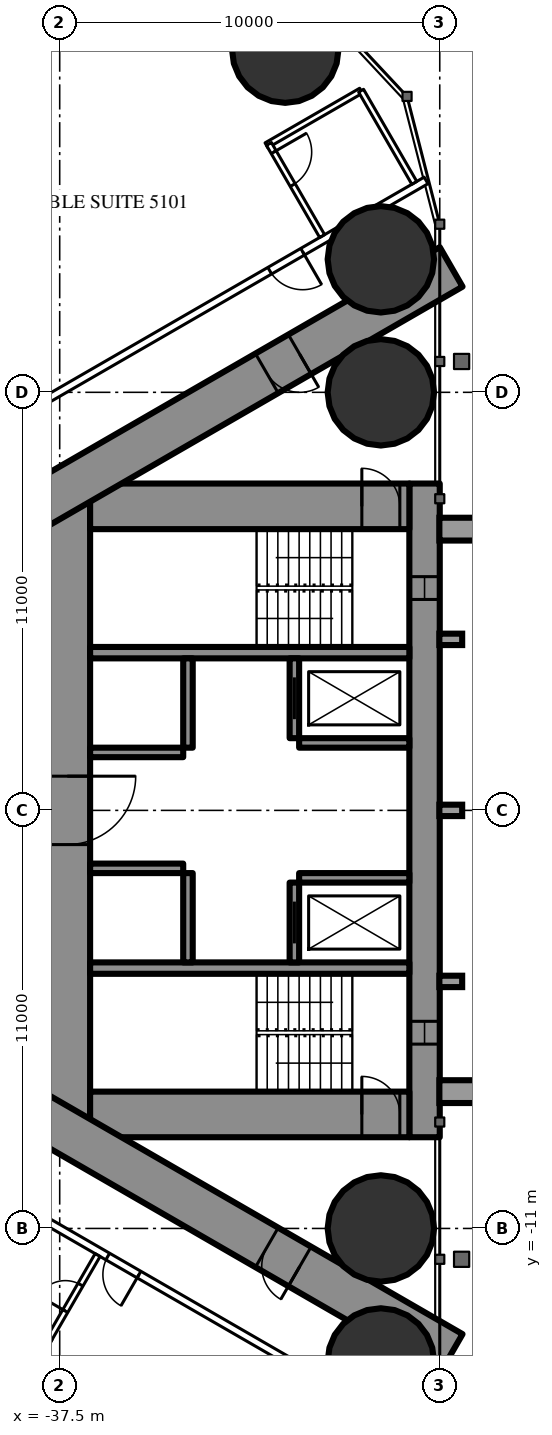
"""IFC4 building model, lengths in metres.
Left out: names, types, materials, properties, quantities, classifications, styles, units other than length and angle.
Written with IfcOpenShell. Run it as: python <this file> out.ifc"""

import sys

from ifc_helpers import new_model, si_unit, direction, frame, frame_2d, origin, origin_2d, place, context, subcontext, project, spatial, rectangle, circle, extrude, element, fill, save


model = new_model("IFC4")
c1 = context("Model", 3, precision=1e-05, world=origin(), true_north=direction((0.0, 1.0)))
c2 = subcontext(c1, "Body", "Model", "MODEL_VIEW")
j1 = project(units=[si_unit("LENGTHUNIT", "METRE"), si_unit("PLANEANGLEUNIT", "RADIAN")], contexts=[c1])
p1 = place(None, origin())
s1 = spatial("IfcSite", under=j1, at=p1, CompositionType="ELEMENT")
p2 = place(p1, origin())
s2 = spatial("IfcBuilding", under=s1, at=p2, CompositionType="ELEMENT")
p3 = place(p2, frame((0.0, 0.0, 191.3)))
s3 = spatial("IfcBuildingStorey", under=s2, at=p3, CompositionType="ELEMENT", Elevation=191.3)
for number, where, z_axis, x_axis in (
    (1, (-31.565, 20.016, 0.0), (0.0, 0.0, 1.0), (1.0, 0.0, 0.0)),
    (2, (-29.05, -11.0, 0.0), (0.0, 0.0, 1.0), (1.0, 0.0, 0.0)),
    (3, (-29.05, 11.0, 0.0), (0.0, 0.0, 1.0), (1.0, 0.0, 0.0)),
    (4, (-29.05, 14.5, 0.0), (0.0, 0.0, 1.0), (1.0, 0.0, 0.0)),
    (5, (-29.05, -14.5, 0.0), (0.0, 0.0, 1.0), (1.0, 0.0, 0.0)),
):
    element("IfcColumn", number, at=place(p3, frame(where, z_axis=z_axis, x_axis=x_axis)), inside=s3, PredefinedType="COLUMN", context=c2, shape_type="SweptSolid", body=[
        extrude(circle(Radius=1.4, at=origin_2d()), origin(), (0.0, 0.0, 1.0), 3.5),
    ])
p4 = place(p3, frame((-27.9, 8.6, 0.0), z_axis=(0.0, 0.0, 1.0), x_axis=(0.0, -1.0, 0.0)))
e6 = element("IfcWall", 6, at=p4, inside=s3, PredefinedType="SHEAR", context=c2, shape_type="SweptSolid", body=[
    extrude(rectangle(XDim=17.2, YDim=0.8, at=frame_2d((8.6, 0.0))), origin(), (0.0, 0.0, 1.0), 3.5),
])
p5 = place(p4, frame((2.45, 0.0, 0.6)))
e7 = element("IfcOpeningElement", 7, at=p5, cuts=e6, PredefinedType="OPENING", context=c2, shape_type="SweptSolid", body=[
    extrude(rectangle(XDim=0.6, YDim=2.1, at=frame_2d((0.3, 1.05))), frame((0.0, 0.41, 0.0), z_axis=(0.0, -1.0, 0.0), x_axis=(1.0, 0.0, 0.0)), (0.0, 0.0, 1.0), 0.82),
])
p6 = place(p4, frame((14.15, 0.0, 0.6)))
e8 = element("IfcOpeningElement", 8, at=p6, cuts=e6, PredefinedType="OPENING", context=c2, shape_type="SweptSolid", body=[
    extrude(rectangle(XDim=0.6, YDim=2.1, at=frame_2d((0.3, 1.05))), frame((0.0, 0.41, 0.0), z_axis=(0.0, -1.0, 0.0), x_axis=(1.0, 0.0, 0.0)), (0.0, 0.0, 1.0), 0.82),
])
p7 = place(p3, frame((-37.3, 8.6, 0.0), z_axis=(0.0, 0.0, 1.0), x_axis=(0.0, -1.0, 0.0)))
e9 = element("IfcWall", 9, at=p7, inside=s3, PredefinedType="SHEAR", context=c2, shape_type="SweptSolid", body=[
    extrude(rectangle(XDim=17.2, YDim=1.2, at=frame_2d((8.6, 0.0))), origin(), (0.0, 0.0, 1.0), 3.5),
])
p8 = place(p7, frame((7.7, 0.0, 0.0)))
e10 = element("IfcOpeningElement", 10, at=p8, cuts=e9, PredefinedType="OPENING", context=c2, shape_type="SweptSolid", body=[
    extrude(rectangle(XDim=1.8, YDim=2.2, at=frame_2d((0.9, 1.1))), frame((0.0, 0.61, 0.0), z_axis=(0.0, -1.0, 0.0), x_axis=(1.0, 0.0, 0.0)), (0.0, 0.0, 1.0), 1.22),
])
p9 = place(p3, frame((-28.3, 8.0, 0.0), z_axis=(0.0, 0.0, 1.0), x_axis=(-1.0, 0.0, 0.0)))
e11 = element("IfcWall", 11, at=p9, inside=s3, PredefinedType="SHEAR", context=c2, shape_type="SweptSolid", body=[
    extrude(rectangle(XDim=8.4, YDim=1.2, at=frame_2d((4.2, 0.0))), origin(), (0.0, 0.0, 1.0), 3.5),
])
p10 = place(p9, frame((0.25, 0.0, 0.0)))
e12 = element("IfcOpeningElement", 12, at=p10, cuts=e11, PredefinedType="OPENING", context=c2, shape_type="SweptSolid", body=[
    extrude(rectangle(XDim=1.0, YDim=2.2, at=frame_2d((0.5, 1.1))), frame((0.0, 0.61, 0.0), z_axis=(0.0, -1.0, 0.0), x_axis=(1.0, 0.0, 0.0)), (0.0, 0.0, 1.0), 1.22),
])
p11 = place(p3, frame((-28.3, -8.0, 0.0), z_axis=(0.0, 0.0, 1.0), x_axis=(-1.0, 0.0, 0.0)))
e13 = element("IfcWall", 13, at=p11, inside=s3, PredefinedType="SHEAR", context=c2, shape_type="SweptSolid", body=[
    extrude(rectangle(XDim=8.4, YDim=1.2, at=frame_2d((4.2, 0.0))), origin(), (0.0, 0.0, 1.0), 3.5),
])
p12 = place(p11, frame((0.25, 0.0, 0.0)))
e14 = element("IfcOpeningElement", 14, at=p12, cuts=e13, PredefinedType="OPENING", context=c2, shape_type="SweptSolid", body=[
    extrude(rectangle(XDim=1.0, YDim=2.2, at=frame_2d((0.5, 1.1))), frame((0.0, 0.61, 0.0), z_axis=(0.0, -1.0, 0.0), x_axis=(1.0, 0.0, 0.0)), (0.0, 0.0, 1.0), 1.22),
])
for number, where, z_axis, x_axis in (
    (15, (-28.3, 4.15, 0.0), (0.0, 0.0, 1.0), (-1.0, 0.0, 0.0)),
    (16, (-28.3, -4.15, 0.0), (0.0, 0.0, 1.0), (-1.0, 0.0, 0.0)),
):
    element("IfcWall", number, at=place(p3, frame(where, z_axis=z_axis, x_axis=x_axis)), inside=s3, PredefinedType="SHEAR", context=c2, shape_type="SweptSolid", body=[
        extrude(rectangle(XDim=8.4, YDim=0.3, at=frame_2d((4.2, 0.0))), origin(), (0.0, 0.0, 1.0), 3.5),
    ])
p13 = place(p3, frame((-31.325, 4.0, 0.0), z_axis=(0.0, 0.0, 1.0), x_axis=(0.0, -1.0, 0.0)))
e17 = element("IfcWall", 17, at=p13, inside=s3, PredefinedType="SHEAR", context=c2, shape_type="SweptSolid", body=[
    extrude(rectangle(XDim=2.1, YDim=0.25, at=frame_2d((1.05, 0.0))), origin(), (0.0, 0.0, 1.0), 3.5),
])
p14 = place(p13, frame((0.5, 0.0, 0.0)))
e18 = element("IfcOpeningElement", 18, at=p14, cuts=e17, PredefinedType="OPENING", context=c2, shape_type="SweptSolid", body=[
    extrude(rectangle(XDim=1.1, YDim=2.2, at=frame_2d((0.55, 1.1))), frame((0.0, 0.135, 0.0), z_axis=(0.0, -1.0, 0.0), x_axis=(1.0, 0.0, 0.0)), (0.0, 0.0, 1.0), 0.27),
])
p15 = place(p3, frame((-34.125, 4.0, 0.0), z_axis=(0.0, 0.0, 1.0), x_axis=(0.0, -1.0, 0.0)))
e19 = element("IfcWall", 19, at=p15, inside=s3, PredefinedType="SHEAR", context=c2, shape_type="SweptSolid", body=[
    extrude(rectangle(XDim=2.35, YDim=0.25, at=frame_2d((1.175, 0.0))), origin(), (0.0, 0.0, 1.0), 3.5),
])
p16 = place(p3, frame((-28.3, 1.775, 0.0), z_axis=(0.0, 0.0, 1.0), x_axis=(-1.0, 0.0, 0.0)))
e20 = element("IfcWall", 20, at=p16, inside=s3, PredefinedType="SHEAR", context=c2, shape_type="SweptSolid", body=[
    extrude(rectangle(XDim=2.9, YDim=0.25, at=frame_2d((1.45, 0.0))), origin(), (0.0, 0.0, 1.0), 3.5),
])
p17 = place(p3, frame((-34.25, 1.525, 0.0), z_axis=(0.0, 0.0, 1.0), x_axis=(-1.0, 0.0, 0.0)))
e21 = element("IfcWall", 21, at=p17, inside=s3, PredefinedType="SHEAR", context=c2, shape_type="SweptSolid", body=[
    extrude(rectangle(XDim=2.45, YDim=0.25, at=frame_2d((1.225, 0.0))), origin(), (0.0, 0.0, 1.0), 3.5),
])
p18 = place(p3, frame((-31.325, -1.9, 0.0), z_axis=(0.0, 0.0, 1.0), x_axis=(0.0, -1.0, 0.0)))
e22 = element("IfcWall", 22, at=p18, inside=s3, PredefinedType="SHEAR", context=c2, shape_type="SweptSolid", body=[
    extrude(rectangle(XDim=2.1, YDim=0.25, at=frame_2d((1.05, 0.0))), origin(), (0.0, 0.0, 1.0), 3.5),
])
p19 = place(p18, frame((0.5, 0.0, 0.0)))
e23 = element("IfcOpeningElement", 23, at=p19, cuts=e22, PredefinedType="OPENING", context=c2, shape_type="SweptSolid", body=[
    extrude(rectangle(XDim=1.1, YDim=2.2, at=frame_2d((0.55, 1.1))), frame((0.0, 0.135, 0.0), z_axis=(0.0, -1.0, 0.0), x_axis=(1.0, 0.0, 0.0)), (0.0, 0.0, 1.0), 0.27),
])
p20 = place(p3, frame((-34.125, -1.65, 0.0), z_axis=(0.0, 0.0, 1.0), x_axis=(0.0, -1.0, 0.0)))
e24 = element("IfcWall", 24, at=p20, inside=s3, PredefinedType="SHEAR", context=c2, shape_type="SweptSolid", body=[
    extrude(rectangle(XDim=2.35, YDim=0.25, at=frame_2d((1.175, 0.0))), origin(), (0.0, 0.0, 1.0), 3.5),
])
p21 = place(p3, frame((-28.3, -1.775, 0.0), z_axis=(0.0, 0.0, 1.0), x_axis=(-1.0, 0.0, 0.0)))
e25 = element("IfcWall", 25, at=p21, inside=s3, PredefinedType="SHEAR", context=c2, shape_type="SweptSolid", body=[
    extrude(rectangle(XDim=2.9, YDim=0.25, at=frame_2d((1.45, 0.0))), origin(), (0.0, 0.0, 1.0), 3.5),
])
p22 = place(p3, frame((-34.25, -1.525, 0.0), z_axis=(0.0, 0.0, 1.0), x_axis=(-1.0, 0.0, 0.0)))
e26 = element("IfcWall", 26, at=p22, inside=s3, PredefinedType="SHEAR", context=c2, shape_type="SweptSolid", body=[
    extrude(rectangle(XDim=2.45, YDim=0.25, at=frame_2d((1.225, 0.0))), origin(), (0.0, 0.0, 1.0), 3.5),
])
p23 = place(p3, frame((-27.2, 14.3, 0.0), z_axis=(0.0, 0.0, 1.0), x_axis=(-0.866026593062, -0.499997940104, 0.0)))
e27 = element("IfcWall", 27, at=p23, inside=s3, PredefinedType="SHEAR", context=c2, shape_type="SweptSolid", body=[
    extrude(rectangle(XDim=28.946, YDim=1.2, at=frame_2d((14.473, 0.0))), origin(), (0.0, 0.0, 1.0), 3.5),
])
p24 = place(p23, frame((4.6, 0.0, 0.0)))
e28 = element("IfcOpeningElement", 28, at=p24, cuts=e27, PredefinedType="OPENING", context=c2, shape_type="SweptSolid", body=[
    extrude(rectangle(XDim=1.0, YDim=2.2, at=frame_2d((0.5, 1.1))), frame((0.0, 0.61, 0.0), z_axis=(0.0, -1.0, 0.0), x_axis=(1.0, 0.0, 0.0)), (0.0, 0.0, 1.0), 1.22),
])
p25 = place(p23, frame((13.395, 0.0, 0.0)))
e29 = element("IfcOpeningElement", 29, at=p25, cuts=e27, PredefinedType="OPENING", context=c2, shape_type="SweptSolid", body=[
    extrude(rectangle(XDim=1.8, YDim=2.2, at=frame_2d((0.9, 1.1))), frame((0.0, 0.61, 0.0), z_axis=(0.0, -1.0, 0.0), x_axis=(1.0, 0.0, 0.0)), (0.0, 0.0, 1.0), 1.22),
])
p26 = place(p3, frame((-27.2, -14.3, 0.0), z_axis=(0.0, 0.0, 1.0), x_axis=(-0.866024021859, 0.500002393557, 0.0)))
e30 = element("IfcWall", 30, at=p26, inside=s3, PredefinedType="SHEAR", context=c2, shape_type="SweptSolid", body=[
    extrude(rectangle(XDim=27.907, YDim=1.2, at=frame_2d((13.954, 0.0))), origin(), (0.0, 0.0, 1.0), 3.5),
])
p27 = place(p26, frame((4.6, 0.0, 0.0)))
e31 = element("IfcOpeningElement", 31, at=p27, cuts=e30, PredefinedType="OPENING", context=c2, shape_type="SweptSolid", body=[
    extrude(rectangle(XDim=1.0, YDim=2.2, at=frame_2d((0.5, 1.1))), frame((0.0, 0.61, 0.0), z_axis=(0.0, -1.0, 0.0), x_axis=(1.0, 0.0, 0.0)), (0.0, 0.0, 1.0), 1.22),
])
p28 = place(p26, frame((13.395, 0.0, 0.0)))
e32 = element("IfcOpeningElement", 32, at=p28, cuts=e30, PredefinedType="OPENING", context=c2, shape_type="SweptSolid", body=[
    extrude(rectangle(XDim=1.8, YDim=2.2, at=frame_2d((0.9, 1.1))), frame((0.0, 0.61, 0.0), z_axis=(0.0, -1.0, 0.0), x_axis=(1.0, 0.0, 0.0)), (0.0, 0.0, 1.0), 1.22),
])
p29 = place(p3, frame((-27.86, 16.575, 0.0), z_axis=(0.0, 0.0, 1.0), x_axis=(-0.866025533911, -0.499999774615, 0.0)))
e33 = element("IfcWall", 33, at=p29, inside=s3, PredefinedType="PARTITIONING", context=c2, shape_type="SweptSolid", body=[
    extrude(rectangle(XDim=33.149, YDim=0.2, at=frame_2d((16.575, 0.0))), origin(), (0.0, 0.0, 1.0), 3.25),
])
p30 = place(p29, frame((3.75, 0.0, 0.0)))
e34 = element("IfcOpeningElement", 34, at=p30, cuts=e33, PredefinedType="OPENING", context=c2, shape_type="SweptSolid", body=[
    extrude(rectangle(XDim=1.0, YDim=2.2, at=frame_2d((0.5, 1.1))), frame((0.0, 0.11, 0.0), z_axis=(0.0, -1.0, 0.0), x_axis=(1.0, 0.0, 0.0)), (0.0, 0.0, 1.0), 0.22),
])
p31 = place(p29, frame((16.402, 0.0, 0.0)))
e35 = element("IfcOpeningElement", 35, at=p31, cuts=e33, PredefinedType="OPENING", context=c2, shape_type="SweptSolid", body=[
    extrude(rectangle(XDim=0.95, YDim=2.2, at=frame_2d((0.475, 1.1))), frame((0.0, 0.11, 0.0), z_axis=(0.0, -1.0, 0.0), x_axis=(1.0, 0.0, 0.0)), (0.0, 0.0, 1.0), 0.22),
])
p32 = place(p29, frame((22.047, 0.0, 0.0)))
e36 = element("IfcOpeningElement", 36, at=p32, cuts=e33, PredefinedType="OPENING", context=c2, shape_type="SweptSolid", body=[
    extrude(rectangle(XDim=0.95, YDim=2.2, at=frame_2d((0.475, 1.1))), frame((0.0, 0.11, 0.0), z_axis=(0.0, -1.0, 0.0), x_axis=(1.0, 0.0, 0.0)), (0.0, 0.0, 1.0), 0.22),
])
p33 = place(p29, frame((30.396, 0.0, 0.0)))
e37 = element("IfcOpeningElement", 37, at=p33, cuts=e33, PredefinedType="OPENING", context=c2, shape_type="SweptSolid", body=[
    extrude(rectangle(XDim=1.8, YDim=2.2, at=frame_2d((0.9, 1.1))), frame((0.0, 0.11, 0.0), z_axis=(0.0, -1.0, 0.0), x_axis=(1.0, 0.0, 0.0)), (0.0, 0.0, 1.0), 0.22),
])
p34 = place(p3, frame((-27.86, -16.575, 0.0), z_axis=(0.0, 0.0, 1.0), x_axis=(-0.866027756871, 0.499995924312, 0.0)))
e38 = element("IfcWall", 38, at=p34, inside=s3, PredefinedType="PARTITIONING", context=c2, shape_type="SweptSolid", body=[
    extrude(rectangle(XDim=12.622, YDim=0.2, at=frame_2d((6.311, 0.0))), origin(), (0.0, 0.0, 1.0), 3.25),
])
p35 = place(p34, frame((8.722, 0.0, 0.0)))
e39 = element("IfcOpeningElement", 39, at=p35, cuts=e38, PredefinedType="OPENING", context=c2, shape_type="SweptSolid", body=[
    extrude(rectangle(XDim=0.95, YDim=2.2, at=frame_2d((0.475, 1.1))), frame((0.0, 0.11, 0.0), z_axis=(0.0, -1.0, 0.0), x_axis=(1.0, 0.0, 0.0)), (0.0, 0.0, 1.0), 0.22),
])
p36 = place(p3, frame((-29.57, 18.936, 0.0), z_axis=(0.0, 0.0, 1.0), x_axis=(-0.866018712932, -0.500011588718, 0.0)))
e40 = element("IfcWall", 40, at=p36, inside=s3, PredefinedType="PARTITIONING", context=c2, shape_type="SweptSolid", body=[
    extrude(rectangle(XDim=2.875, YDim=0.15, at=frame_2d((1.438, 0.0))), origin(), (0.0, 0.0, 1.0), 3.25),
])
p37 = place(p3, frame((-30.595, 15.111, 0.0), z_axis=(0.0, 0.0, 1.0), x_axis=(-0.49998411664, 0.866034573852, 0.0)))
e41 = element("IfcWall", 41, at=p37, inside=s3, PredefinedType="PARTITIONING", context=c2, shape_type="SweptSolid", body=[
    extrude(rectangle(XDim=2.8, YDim=0.15, at=frame_2d((1.4, 0.0))), origin(), (0.0, 0.0, 1.0), 3.25),
])
p38 = place(p37, frame((1.55, 0.0, 0.0)))
e42 = element("IfcOpeningElement", 42, at=p38, cuts=e41, PredefinedType="OPENING", context=c2, shape_type="SweptSolid", body=[
    extrude(rectangle(XDim=1.0, YDim=2.2, at=frame_2d((0.5, 1.1))), frame((0.0, 0.085, 0.0), z_axis=(0.0, -1.0, 0.0), x_axis=(1.0, 0.0, 0.0)), (0.0, 0.0, 1.0), 0.17),
])
p39 = place(p3, frame((-28.17, 16.511, 0.0), z_axis=(0.0, 0.0, 1.0), x_axis=(-0.49994636267, 0.866056369097, 0.0)))
e43 = element("IfcWall", 43, at=p39, inside=s3, PredefinedType="PARTITIONING", context=c2, shape_type="SweptSolid", body=[
    extrude(rectangle(XDim=2.8, YDim=0.15, at=frame_2d((1.4, 0.0))), origin(), (0.0, 0.0, 1.0), 3.25),
])
p40 = place(p3, frame((-36.503, -11.7, 0.0), z_axis=(0.0, 0.0, 1.0), x_axis=(-0.500006934395, -0.866021400173, 0.0)))
e44 = element("IfcWall", 44, at=p40, inside=s3, PredefinedType="PARTITIONING", context=c2, shape_type="SweptSolid", body=[
    extrude(rectangle(XDim=2.6, YDim=0.15, at=frame_2d((1.3, 0.0))), origin(), (0.0, 0.0, 1.0), 3.25),
])
p41 = place(p40, frame((0.9, 0.0, 0.0)))
e45 = element("IfcOpeningElement", 45, at=p41, cuts=e44, PredefinedType="OPENING", context=c2, shape_type="SweptSolid", body=[
    extrude(rectangle(XDim=0.8, YDim=2.2, at=frame_2d((0.4, 1.1))), frame((0.0, 0.085, 0.0), z_axis=(0.0, -1.0, 0.0), x_axis=(1.0, 0.0, 0.0)), (0.0, 0.0, 1.0), 0.17),
])
p42 = place(p38, origin())
e46 = element("IfcDoor", 46, at=p42, inside=s3, OperationType="SINGLE_SWING_RIGHT", PredefinedType="DOOR", context=c2, shape_type="SweptSolid", body=[
    extrude(rectangle(XDim=1.0, YDim=2.2, at=frame_2d((0.5, 1.1))), frame((0.0, 0.025, 0.0), z_axis=(0.0, -1.0, 0.0), x_axis=(1.0, 0.0, 0.0)), (0.0, 0.0, 1.0), 0.05),
])
fill(e42, e46)
p43 = place(p30, origin())
e47 = element("IfcDoor", 47, at=p43, inside=s3, OperationType="SINGLE_SWING_LEFT", PredefinedType="DOOR", context=c2, shape_type="SweptSolid", body=[
    extrude(rectangle(XDim=1.0, YDim=2.2, at=frame_2d((0.5, 1.1))), frame((0.0, 0.025, 0.0), z_axis=(0.0, -1.0, 0.0), x_axis=(1.0, 0.0, 0.0)), (0.0, 0.0, 1.0), 0.05),
])
fill(e34, e47)
p44 = place(p41, origin())
e48 = element("IfcDoor", 48, at=p44, inside=s3, OperationType="SINGLE_SWING_RIGHT", PredefinedType="DOOR", context=c2, shape_type="SweptSolid", body=[
    extrude(rectangle(XDim=0.8, YDim=2.2, at=frame_2d((0.4, 1.1))), frame((0.0, 0.025, 0.0), z_axis=(0.0, -1.0, 0.0), x_axis=(1.0, 0.0, 0.0)), (0.0, 0.0, 1.0), 0.05),
])
fill(e45, e48)
p45 = place(p35, origin())
e49 = element("IfcDoor", 49, at=p45, inside=s3, OperationType="SINGLE_SWING_LEFT", PredefinedType="DOOR", context=c2, shape_type="SweptSolid", body=[
    extrude(rectangle(XDim=0.95, YDim=2.2, at=frame_2d((0.475, 1.1))), frame((0.0, 0.025, 0.0), z_axis=(0.0, -1.0, 0.0), x_axis=(1.0, 0.0, 0.0)), (0.0, 0.0, 1.0), 0.05),
])
fill(e39, e49)
p46 = place(p24, origin())
e50 = element("IfcDoor", 50, at=p46, inside=s3, OperationType="SINGLE_SWING_LEFT", PredefinedType="DOOR", context=c2, shape_type="SweptSolid", body=[
    extrude(rectangle(XDim=1.0, YDim=2.2, at=frame_2d((0.5, 1.1))), frame((0.0, 0.025, 0.0), z_axis=(0.0, -1.0, 0.0), x_axis=(1.0, 0.0, 0.0)), (0.0, 0.0, 1.0), 0.05),
])
fill(e28, e50)
p47 = place(p27, origin())
e51 = element("IfcDoor", 51, at=p47, inside=s3, OperationType="SINGLE_SWING_LEFT", PredefinedType="DOOR", context=c2, shape_type="SweptSolid", body=[
    extrude(rectangle(XDim=1.0, YDim=2.2, at=frame_2d((0.5, 1.1))), frame((0.0, 0.025, 0.0), z_axis=(0.0, -1.0, 0.0), x_axis=(1.0, 0.0, 0.0)), (0.0, 0.0, 1.0), 0.05),
])
fill(e31, e51)
p48 = place(p8, origin())
e52 = element("IfcDoor", 52, at=p48, inside=s3, OperationType="DOUBLE_DOOR_SINGLE_SWING", PredefinedType="DOOR", context=c2, shape_type="SweptSolid", body=[
    extrude(rectangle(XDim=1.8, YDim=2.2, at=frame_2d((0.9, 1.1))), frame((0.0, 0.025, 0.0), z_axis=(0.0, -1.0, 0.0), x_axis=(1.0, 0.0, 0.0)), (0.0, 0.0, 1.0), 0.05),
])
fill(e10, e52)
p49 = place(p10, origin())
e53 = element("IfcDoor", 53, at=p49, inside=s3, OperationType="SINGLE_SWING_RIGHT", PredefinedType="DOOR", context=c2, shape_type="SweptSolid", body=[
    extrude(rectangle(XDim=1.0, YDim=2.2, at=frame_2d((0.5, 1.1))), frame((0.0, 0.025, 0.0), z_axis=(0.0, -1.0, 0.0), x_axis=(1.0, 0.0, 0.0)), (0.0, 0.0, 1.0), 0.05),
])
fill(e12, e53)
p50 = place(p12, origin())
e54 = element("IfcDoor", 54, at=p50, inside=s3, OperationType="SINGLE_SWING_RIGHT", PredefinedType="DOOR", context=c2, shape_type="SweptSolid", body=[
    extrude(rectangle(XDim=1.0, YDim=2.2, at=frame_2d((0.5, 1.1))), frame((0.0, 0.025, 0.0), z_axis=(0.0, -1.0, 0.0), x_axis=(1.0, 0.0, 0.0)), (0.0, 0.0, 1.0), 0.05),
])
fill(e14, e54)
p51 = place(p14, origin())
e55 = element("IfcDoor", 55, at=p51, inside=s3, OperationType="SLIDING_TO_LEFT", PredefinedType="USERDEFINED", context=c2, shape_type="SweptSolid", body=[
    extrude(rectangle(XDim=1.1, YDim=2.2, at=frame_2d((0.55, 1.1))), frame((0.0, 0.025, 0.0), z_axis=(0.0, -1.0, 0.0), x_axis=(1.0, 0.0, 0.0)), (0.0, 0.0, 1.0), 0.05),
])
fill(e18, e55)
p52 = place(p19, origin())
e56 = element("IfcDoor", 56, at=p52, inside=s3, OperationType="SLIDING_TO_LEFT", PredefinedType="USERDEFINED", context=c2, shape_type="SweptSolid", body=[
    extrude(rectangle(XDim=1.1, YDim=2.2, at=frame_2d((0.55, 1.1))), frame((0.0, 0.025, 0.0), z_axis=(0.0, -1.0, 0.0), x_axis=(1.0, 0.0, 0.0)), (0.0, 0.0, 1.0), 0.05),
])
fill(e23, e56)
p53 = place(p5, origin())
e57 = element("IfcWindow", 57, at=p53, inside=s3, PartitioningType="SINGLE_PANEL", PredefinedType="WINDOW", context=c2, shape_type="SweptSolid", body=[
    extrude(rectangle(XDim=0.6, YDim=2.1, at=frame_2d((0.3, 1.05))), frame((0.0, 0.03, 0.0), z_axis=(0.0, -1.0, 0.0), x_axis=(1.0, 0.0, 0.0)), (0.0, 0.0, 1.0), 0.06),
])
fill(e7, e57)
p54 = place(p6, origin())
e58 = element("IfcWindow", 58, at=p54, inside=s3, PartitioningType="SINGLE_PANEL", PredefinedType="WINDOW", context=c2, shape_type="SweptSolid", body=[
    extrude(rectangle(XDim=0.6, YDim=2.1, at=frame_2d((0.3, 1.05))), frame((0.0, 0.03, 0.0), z_axis=(0.0, -1.0, 0.0), x_axis=(1.0, 0.0, 0.0)), (0.0, 0.0, 1.0), 0.06),
])
fill(e8, e58)
save(model, sys.argv[1])
